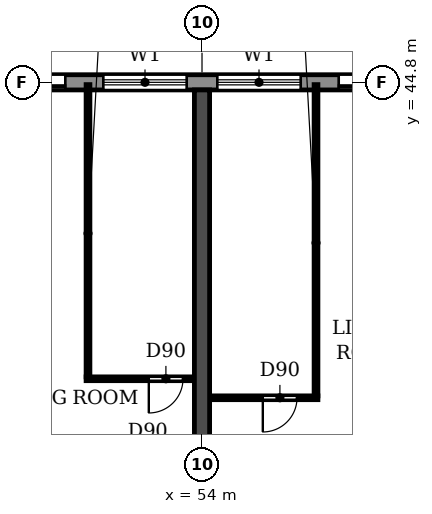
"""IFC4 building model, lengths in metres.
Left out: names, types, materials, properties, quantities, classifications, styles, units other than length and angle.
Written with IfcOpenShell. Run it as: python <this file> out.ifc"""

import sys

from ifc_helpers import new_model, si_unit, direction, frame, frame_2d, origin, place, context, subcontext, project, spatial, rectangle, extrude, element, fill, save


model = new_model("IFC4")
c1 = context("Model", 3, precision=1e-05, world=origin(), true_north=direction((0.0, 1.0)))
c2 = subcontext(c1, "Body", "Model", "MODEL_VIEW")
j1 = project(units=[si_unit("LENGTHUNIT", "METRE"), si_unit("PLANEANGLEUNIT", "RADIAN")], contexts=[c1])
p1 = place(None, origin())
s1 = spatial("IfcSite", under=j1, at=p1, CompositionType="ELEMENT")
p2 = place(p1, origin())
s2 = spatial("IfcBuilding", under=s1, at=p2, CompositionType="ELEMENT")
p3 = place(p2, frame((0.0, 0.0, 23.4)))
s3 = spatial("IfcBuildingStorey", under=s2, at=p3, CompositionType="ELEMENT", Elevation=23.4)
p4 = place(p3, frame((54.0, 30.55, 0.0), z_axis=(0.0, 0.0, 1.0), x_axis=(0.0, 1.0, 0.0)))
e1 = element("IfcWall", 1, at=p4, inside=s3, PredefinedType="SHEAR", context=c2, shape_type="SweptSolid", body=[
    extrude(rectangle(XDim=14.05, YDim=0.4, at=frame_2d((7.025, 0.0))), origin(), (0.0, 0.0, 1.0), 3.05),
])
p5 = place(p3, frame((97.317, 44.8, 0.0), z_axis=(0.0, 0.0, 1.0), x_axis=(-1.0, 0.0, 0.0)))
e2 = element("IfcWall", 2, at=p5, inside=s3, PredefinedType="STANDARD", context=c2, shape_type="SweptSolid", body=[
    extrude(rectangle(XDim=92.634, YDim=0.4, at=frame_2d((46.317, 0.0))), origin(), (0.0, 0.0, 1.0), 3.05),
])
p6 = place(p5, frame((88.717, 0.0, 0.9)))
e3 = element("IfcOpeningElement", 3, at=p6, cuts=e2, PredefinedType="OPENING", context=c2, shape_type="SweptSolid", body=[
    extrude(rectangle(XDim=2.2, YDim=1.5, at=frame_2d((1.1, 0.75))), frame((0.0, 0.21, 0.0), z_axis=(0.0, -1.0, 0.0), x_axis=(1.0, 0.0, 0.0)), (0.0, 0.0, 1.0), 0.42),
])
p7 = place(p5, frame((85.917, 0.0, 0.0)))
e4 = element("IfcOpeningElement", 4, at=p7, cuts=e2, PredefinedType="OPENING", context=c2, shape_type="SweptSolid", body=[
    extrude(rectangle(XDim=1.8, YDim=2.4, at=frame_2d((0.9, 1.2))), frame((0.0, 0.21, 0.0), z_axis=(0.0, -1.0, 0.0), x_axis=(1.0, 0.0, 0.0)), (0.0, 0.0, 1.0), 0.42),
])
p8 = place(p5, frame((82.717, 0.0, 0.9)))
e5 = element("IfcOpeningElement", 5, at=p8, cuts=e2, PredefinedType="OPENING", context=c2, shape_type="SweptSolid", body=[
    extrude(rectangle(XDim=2.2, YDim=1.5, at=frame_2d((1.1, 0.75))), frame((0.0, 0.21, 0.0), z_axis=(0.0, -1.0, 0.0), x_axis=(1.0, 0.0, 0.0)), (0.0, 0.0, 1.0), 0.42),
])
p9 = place(p5, frame((79.717, 0.0, 0.9)))
e6 = element("IfcOpeningElement", 6, at=p9, cuts=e2, PredefinedType="OPENING", context=c2, shape_type="SweptSolid", body=[
    extrude(rectangle(XDim=2.2, YDim=1.5, at=frame_2d((1.1, 0.75))), frame((0.0, 0.21, 0.0), z_axis=(0.0, -1.0, 0.0), x_axis=(1.0, 0.0, 0.0)), (0.0, 0.0, 1.0), 0.42),
])
p10 = place(p5, frame((76.917, 0.0, 0.0)))
e7 = element("IfcOpeningElement", 7, at=p10, cuts=e2, PredefinedType="OPENING", context=c2, shape_type="SweptSolid", body=[
    extrude(rectangle(XDim=1.8, YDim=2.4, at=frame_2d((0.9, 1.2))), frame((0.0, 0.21, 0.0), z_axis=(0.0, -1.0, 0.0), x_axis=(1.0, 0.0, 0.0)), (0.0, 0.0, 1.0), 0.42),
])
p11 = place(p5, frame((73.717, 0.0, 0.9)))
e8 = element("IfcOpeningElement", 8, at=p11, cuts=e2, PredefinedType="OPENING", context=c2, shape_type="SweptSolid", body=[
    extrude(rectangle(XDim=2.2, YDim=1.5, at=frame_2d((1.1, 0.75))), frame((0.0, 0.21, 0.0), z_axis=(0.0, -1.0, 0.0), x_axis=(1.0, 0.0, 0.0)), (0.0, 0.0, 1.0), 0.42),
])
p12 = place(p5, frame((70.717, 0.0, 0.9)))
e9 = element("IfcOpeningElement", 9, at=p12, cuts=e2, PredefinedType="OPENING", context=c2, shape_type="SweptSolid", body=[
    extrude(rectangle(XDim=2.2, YDim=1.5, at=frame_2d((1.1, 0.75))), frame((0.0, 0.21, 0.0), z_axis=(0.0, -1.0, 0.0), x_axis=(1.0, 0.0, 0.0)), (0.0, 0.0, 1.0), 0.42),
])
p13 = place(p5, frame((67.717, 0.0, 0.9)))
e10 = element("IfcOpeningElement", 10, at=p13, cuts=e2, PredefinedType="OPENING", context=c2, shape_type="SweptSolid", body=[
    extrude(rectangle(XDim=2.2, YDim=1.5, at=frame_2d((1.1, 0.75))), frame((0.0, 0.21, 0.0), z_axis=(0.0, -1.0, 0.0), x_axis=(1.0, 0.0, 0.0)), (0.0, 0.0, 1.0), 0.42),
])
p14 = place(p5, frame((64.917, 0.0, 0.0)))
e11 = element("IfcOpeningElement", 11, at=p14, cuts=e2, PredefinedType="OPENING", context=c2, shape_type="SweptSolid", body=[
    extrude(rectangle(XDim=1.8, YDim=2.4, at=frame_2d((0.9, 1.2))), frame((0.0, 0.21, 0.0), z_axis=(0.0, -1.0, 0.0), x_axis=(1.0, 0.0, 0.0)), (0.0, 0.0, 1.0), 0.42),
])
p15 = place(p5, frame((61.717, 0.0, 0.9)))
e12 = element("IfcOpeningElement", 12, at=p15, cuts=e2, PredefinedType="OPENING", context=c2, shape_type="SweptSolid", body=[
    extrude(rectangle(XDim=2.2, YDim=1.5, at=frame_2d((1.1, 0.75))), frame((0.0, 0.21, 0.0), z_axis=(0.0, -1.0, 0.0), x_axis=(1.0, 0.0, 0.0)), (0.0, 0.0, 1.0), 0.42),
])
p16 = place(p5, frame((58.717, 0.0, 0.9)))
e13 = element("IfcOpeningElement", 13, at=p16, cuts=e2, PredefinedType="OPENING", context=c2, shape_type="SweptSolid", body=[
    extrude(rectangle(XDim=2.2, YDim=1.5, at=frame_2d((1.1, 0.75))), frame((0.0, 0.21, 0.0), z_axis=(0.0, -1.0, 0.0), x_axis=(1.0, 0.0, 0.0)), (0.0, 0.0, 1.0), 0.42),
])
p17 = place(p5, frame((55.917, 0.0, 0.0)))
e14 = element("IfcOpeningElement", 14, at=p17, cuts=e2, PredefinedType="OPENING", context=c2, shape_type="SweptSolid", body=[
    extrude(rectangle(XDim=1.8, YDim=2.4, at=frame_2d((0.9, 1.2))), frame((0.0, 0.21, 0.0), z_axis=(0.0, -1.0, 0.0), x_axis=(1.0, 0.0, 0.0)), (0.0, 0.0, 1.0), 0.42),
])
p18 = place(p5, frame((52.917, 0.0, 0.0)))
e15 = element("IfcOpeningElement", 15, at=p18, cuts=e2, PredefinedType="OPENING", context=c2, shape_type="SweptSolid", body=[
    extrude(rectangle(XDim=1.8, YDim=2.4, at=frame_2d((0.9, 1.2))), frame((0.0, 0.21, 0.0), z_axis=(0.0, -1.0, 0.0), x_axis=(1.0, 0.0, 0.0)), (0.0, 0.0, 1.0), 0.42),
])
p19 = place(p5, frame((49.717, 0.0, 0.9)))
e16 = element("IfcOpeningElement", 16, at=p19, cuts=e2, PredefinedType="OPENING", context=c2, shape_type="SweptSolid", body=[
    extrude(rectangle(XDim=2.2, YDim=1.5, at=frame_2d((1.1, 0.75))), frame((0.0, 0.21, 0.0), z_axis=(0.0, -1.0, 0.0), x_axis=(1.0, 0.0, 0.0)), (0.0, 0.0, 1.0), 0.42),
])
p20 = place(p5, frame((46.917, 0.0, 0.0)))
e17 = element("IfcOpeningElement", 17, at=p20, cuts=e2, PredefinedType="OPENING", context=c2, shape_type="SweptSolid", body=[
    extrude(rectangle(XDim=1.8, YDim=2.4, at=frame_2d((0.9, 1.2))), frame((0.0, 0.21, 0.0), z_axis=(0.0, -1.0, 0.0), x_axis=(1.0, 0.0, 0.0)), (0.0, 0.0, 1.0), 0.42),
])
p21 = place(p5, frame((43.717, 0.0, 0.9)))
e18 = element("IfcOpeningElement", 18, at=p21, cuts=e2, PredefinedType="OPENING", context=c2, shape_type="SweptSolid", body=[
    extrude(rectangle(XDim=2.2, YDim=1.5, at=frame_2d((1.1, 0.75))), frame((0.0, 0.21, 0.0), z_axis=(0.0, -1.0, 0.0), x_axis=(1.0, 0.0, 0.0)), (0.0, 0.0, 1.0), 0.42),
])
p22 = place(p5, frame((40.717, 0.0, 0.9)))
e19 = element("IfcOpeningElement", 19, at=p22, cuts=e2, PredefinedType="OPENING", context=c2, shape_type="SweptSolid", body=[
    extrude(rectangle(XDim=2.2, YDim=1.5, at=frame_2d((1.1, 0.75))), frame((0.0, 0.21, 0.0), z_axis=(0.0, -1.0, 0.0), x_axis=(1.0, 0.0, 0.0)), (0.0, 0.0, 1.0), 0.42),
])
p23 = place(p5, frame((37.917, 0.0, 0.0)))
e20 = element("IfcOpeningElement", 20, at=p23, cuts=e2, PredefinedType="OPENING", context=c2, shape_type="SweptSolid", body=[
    extrude(rectangle(XDim=1.8, YDim=2.4, at=frame_2d((0.9, 1.2))), frame((0.0, 0.21, 0.0), z_axis=(0.0, -1.0, 0.0), x_axis=(1.0, 0.0, 0.0)), (0.0, 0.0, 1.0), 0.42),
])
p24 = place(p5, frame((34.917, 0.0, 0.0)))
e21 = element("IfcOpeningElement", 21, at=p24, cuts=e2, PredefinedType="OPENING", context=c2, shape_type="SweptSolid", body=[
    extrude(rectangle(XDim=1.8, YDim=2.4, at=frame_2d((0.9, 1.2))), frame((0.0, 0.21, 0.0), z_axis=(0.0, -1.0, 0.0), x_axis=(1.0, 0.0, 0.0)), (0.0, 0.0, 1.0), 0.42),
])
p25 = place(p5, frame((31.717, 0.0, 0.9)))
e22 = element("IfcOpeningElement", 22, at=p25, cuts=e2, PredefinedType="OPENING", context=c2, shape_type="SweptSolid", body=[
    extrude(rectangle(XDim=2.2, YDim=1.5, at=frame_2d((1.1, 0.75))), frame((0.0, 0.21, 0.0), z_axis=(0.0, -1.0, 0.0), x_axis=(1.0, 0.0, 0.0)), (0.0, 0.0, 1.0), 0.42),
])
p26 = place(p5, frame((28.717, 0.0, 0.9)))
e23 = element("IfcOpeningElement", 23, at=p26, cuts=e2, PredefinedType="OPENING", context=c2, shape_type="SweptSolid", body=[
    extrude(rectangle(XDim=2.2, YDim=1.5, at=frame_2d((1.1, 0.75))), frame((0.0, 0.21, 0.0), z_axis=(0.0, -1.0, 0.0), x_axis=(1.0, 0.0, 0.0)), (0.0, 0.0, 1.0), 0.42),
])
p27 = place(p5, frame((25.717, 0.0, 0.9)))
e24 = element("IfcOpeningElement", 24, at=p27, cuts=e2, PredefinedType="OPENING", context=c2, shape_type="SweptSolid", body=[
    extrude(rectangle(XDim=2.2, YDim=1.5, at=frame_2d((1.1, 0.75))), frame((0.0, 0.21, 0.0), z_axis=(0.0, -1.0, 0.0), x_axis=(1.0, 0.0, 0.0)), (0.0, 0.0, 1.0), 0.42),
])
p28 = place(p5, frame((22.717, 0.0, 0.9)))
e25 = element("IfcOpeningElement", 25, at=p28, cuts=e2, PredefinedType="OPENING", context=c2, shape_type="SweptSolid", body=[
    extrude(rectangle(XDim=2.2, YDim=1.5, at=frame_2d((1.1, 0.75))), frame((0.0, 0.21, 0.0), z_axis=(0.0, -1.0, 0.0), x_axis=(1.0, 0.0, 0.0)), (0.0, 0.0, 1.0), 0.42),
])
p29 = place(p5, frame((19.917, 0.0, 0.0)))
e26 = element("IfcOpeningElement", 26, at=p29, cuts=e2, PredefinedType="OPENING", context=c2, shape_type="SweptSolid", body=[
    extrude(rectangle(XDim=1.8, YDim=2.4, at=frame_2d((0.9, 1.2))), frame((0.0, 0.21, 0.0), z_axis=(0.0, -1.0, 0.0), x_axis=(1.0, 0.0, 0.0)), (0.0, 0.0, 1.0), 0.42),
])
p30 = place(p5, frame((16.717, 0.0, 0.9)))
e27 = element("IfcOpeningElement", 27, at=p30, cuts=e2, PredefinedType="OPENING", context=c2, shape_type="SweptSolid", body=[
    extrude(rectangle(XDim=2.2, YDim=1.5, at=frame_2d((1.1, 0.75))), frame((0.0, 0.21, 0.0), z_axis=(0.0, -1.0, 0.0), x_axis=(1.0, 0.0, 0.0)), (0.0, 0.0, 1.0), 0.42),
])
p31 = place(p5, frame((13.717, 0.0, 0.9)))
e28 = element("IfcOpeningElement", 28, at=p31, cuts=e2, PredefinedType="OPENING", context=c2, shape_type="SweptSolid", body=[
    extrude(rectangle(XDim=2.2, YDim=1.5, at=frame_2d((1.1, 0.75))), frame((0.0, 0.21, 0.0), z_axis=(0.0, -1.0, 0.0), x_axis=(1.0, 0.0, 0.0)), (0.0, 0.0, 1.0), 0.42),
])
p32 = place(p5, frame((10.717, 0.0, 0.9)))
e29 = element("IfcOpeningElement", 29, at=p32, cuts=e2, PredefinedType="OPENING", context=c2, shape_type="SweptSolid", body=[
    extrude(rectangle(XDim=2.2, YDim=1.5, at=frame_2d((1.1, 0.75))), frame((0.0, 0.21, 0.0), z_axis=(0.0, -1.0, 0.0), x_axis=(1.0, 0.0, 0.0)), (0.0, 0.0, 1.0), 0.42),
])
p33 = place(p5, frame((7.917, 0.0, 0.0)))
e30 = element("IfcOpeningElement", 30, at=p33, cuts=e2, PredefinedType="OPENING", context=c2, shape_type="SweptSolid", body=[
    extrude(rectangle(XDim=1.8, YDim=2.4, at=frame_2d((0.9, 1.2))), frame((0.0, 0.21, 0.0), z_axis=(0.0, -1.0, 0.0), x_axis=(1.0, 0.0, 0.0)), (0.0, 0.0, 1.0), 0.42),
])
p34 = place(p5, frame((4.917, 0.0, 0.0)))
e31 = element("IfcOpeningElement", 31, at=p34, cuts=e2, PredefinedType="OPENING", context=c2, shape_type="SweptSolid", body=[
    extrude(rectangle(XDim=1.8, YDim=2.4, at=frame_2d((0.9, 1.2))), frame((0.0, 0.21, 0.0), z_axis=(0.0, -1.0, 0.0), x_axis=(1.0, 0.0, 0.0)), (0.0, 0.0, 1.0), 0.42),
])
p35 = place(p5, frame((1.717, 0.0, 0.9)))
e32 = element("IfcOpeningElement", 32, at=p35, cuts=e2, PredefinedType="OPENING", context=c2, shape_type="SweptSolid", body=[
    extrude(rectangle(XDim=2.2, YDim=1.5, at=frame_2d((1.1, 0.75))), frame((0.0, 0.21, 0.0), z_axis=(0.0, -1.0, 0.0), x_axis=(1.0, 0.0, 0.0)), (0.0, 0.0, 1.0), 0.42),
])
p36 = place(p3, frame((54.21, 36.5, 0.0), z_axis=(0.0, 0.0, 1.0), x_axis=(1.0, 0.0, 0.0)))
e33 = element("IfcWall", 33, at=p36, inside=s3, PredefinedType="PARTITIONING", context=c2, shape_type="SweptSolid", body=[
    extrude(rectangle(XDim=2.84, YDim=0.1, at=frame_2d((1.42, 0.0))), origin(), (0.0, 0.0, 1.0), 3.05),
])
p37 = place(p36, frame((1.39, 0.0, 0.0)))
e34 = element("IfcOpeningElement", 34, at=p37, cuts=e33, PredefinedType="OPENING", context=c2, shape_type="SweptSolid", body=[
    extrude(rectangle(XDim=0.9, YDim=2.1, at=frame_2d((0.45, 1.05))), frame((0.0, 0.06, 0.0), z_axis=(0.0, -1.0, 0.0), x_axis=(1.0, 0.0, 0.0)), (0.0, 0.0, 1.0), 0.12),
])
p38 = place(p3, frame((50.95, 37.0, 0.0), z_axis=(0.0, 0.0, 1.0), x_axis=(1.0, 0.0, 0.0)))
e35 = element("IfcWall", 35, at=p38, inside=s3, PredefinedType="PARTITIONING", context=c2, shape_type="SweptSolid", body=[
    extrude(rectangle(XDim=2.84, YDim=0.1, at=frame_2d((1.42, 0.0))), origin(), (0.0, 0.0, 1.0), 3.05),
])
p39 = place(p38, frame((1.65, 0.0, 0.0)))
e36 = element("IfcOpeningElement", 36, at=p39, cuts=e35, PredefinedType="OPENING", context=c2, shape_type="SweptSolid", body=[
    extrude(rectangle(XDim=0.9, YDim=2.1, at=frame_2d((0.45, 1.05))), frame((0.0, 0.06, 0.0), z_axis=(0.0, -1.0, 0.0), x_axis=(1.0, 0.0, 0.0)), (0.0, 0.0, 1.0), 0.12),
])
p40 = place(p3, frame((51.0, 37.05, 0.0), z_axis=(0.0, 0.0, 1.0), x_axis=(0.0, 1.0, 0.0)))
e37 = element("IfcWall", 37, at=p40, inside=s3, PredefinedType="PARTITIONING", context=c2, shape_type="SweptSolid", body=[
    extrude(rectangle(XDim=7.69, YDim=0.1, at=frame_2d((3.845, 0.0))), origin(), (0.0, 0.0, 1.0), 3.05),
])
p41 = place(p3, frame((57.0, 36.55, 0.0), z_axis=(0.0, 0.0, 1.0), x_axis=(0.0, 1.0, 0.0)))
e38 = element("IfcWall", 38, at=p41, inside=s3, PredefinedType="PARTITIONING", context=c2, shape_type="SweptSolid", body=[
    extrude(rectangle(XDim=8.19, YDim=0.1, at=frame_2d((4.095, 0.0))), origin(), (0.0, 0.0, 1.0), 3.05),
])
p42 = place(p20, origin())
e39 = element("IfcDoor", 39, at=p42, inside=s3, OperationType="DOUBLE_DOOR_SLIDING", PredefinedType="DOOR", context=c2, shape_type="SweptSolid", body=[
    extrude(rectangle(XDim=1.8, YDim=2.4, at=frame_2d((0.9, 1.2))), frame((0.0, 0.025, 0.0), z_axis=(0.0, -1.0, 0.0), x_axis=(1.0, 0.0, 0.0)), (0.0, 0.0, 1.0), 0.05),
])
fill(e17, e39)
p43 = place(p21, origin())
e40 = element("IfcWindow", 40, at=p43, inside=s3, PartitioningType="DOUBLE_PANEL_HORIZONTAL", PredefinedType="WINDOW", context=c2, shape_type="SweptSolid", body=[
    extrude(rectangle(XDim=2.2, YDim=1.5, at=frame_2d((1.1, 0.75))), frame((0.0, 0.03, 0.0), z_axis=(0.0, -1.0, 0.0), x_axis=(1.0, 0.0, 0.0)), (0.0, 0.0, 1.0), 0.06),
])
fill(e18, e40)
p44 = place(p22, origin())
e41 = element("IfcWindow", 41, at=p44, inside=s3, PartitioningType="DOUBLE_PANEL_HORIZONTAL", PredefinedType="WINDOW", context=c2, shape_type="SweptSolid", body=[
    extrude(rectangle(XDim=2.2, YDim=1.5, at=frame_2d((1.1, 0.75))), frame((0.0, 0.03, 0.0), z_axis=(0.0, -1.0, 0.0), x_axis=(1.0, 0.0, 0.0)), (0.0, 0.0, 1.0), 0.06),
])
fill(e19, e41)
p45 = place(p23, origin())
e42 = element("IfcDoor", 42, at=p45, inside=s3, OperationType="DOUBLE_DOOR_SLIDING", PredefinedType="DOOR", context=c2, shape_type="SweptSolid", body=[
    extrude(rectangle(XDim=1.8, YDim=2.4, at=frame_2d((0.9, 1.2))), frame((0.0, 0.025, 0.0), z_axis=(0.0, -1.0, 0.0), x_axis=(1.0, 0.0, 0.0)), (0.0, 0.0, 1.0), 0.05),
])
fill(e20, e42)
p46 = place(p39, frame((0.9, 0.0, 0.0), z_axis=(0.0, 0.0, 1.0), x_axis=(-1.0, 0.0, 0.0)))
e43 = element("IfcDoor", 43, at=p46, inside=s3, OperationType="SINGLE_SWING_RIGHT", PredefinedType="DOOR", context=c2, shape_type="SweptSolid", body=[
    extrude(rectangle(XDim=0.9, YDim=2.1, at=frame_2d((0.45, 1.05))), frame((0.0, 0.025, 0.0), z_axis=(0.0, -1.0, 0.0), x_axis=(1.0, 0.0, 0.0)), (0.0, 0.0, 1.0), 0.05),
])
fill(e36, e43)
p47 = place(p37, frame((0.9, 0.0, 0.0), z_axis=(0.0, 0.0, 1.0), x_axis=(-1.0, 0.0, 0.0)))
e44 = element("IfcDoor", 44, at=p47, inside=s3, OperationType="SINGLE_SWING_RIGHT", PredefinedType="DOOR", context=c2, shape_type="SweptSolid", body=[
    extrude(rectangle(XDim=0.9, YDim=2.1, at=frame_2d((0.45, 1.05))), frame((0.0, 0.025, 0.0), z_axis=(0.0, -1.0, 0.0), x_axis=(1.0, 0.0, 0.0)), (0.0, 0.0, 1.0), 0.05),
])
fill(e34, e44)
save(model, sys.argv[1])
